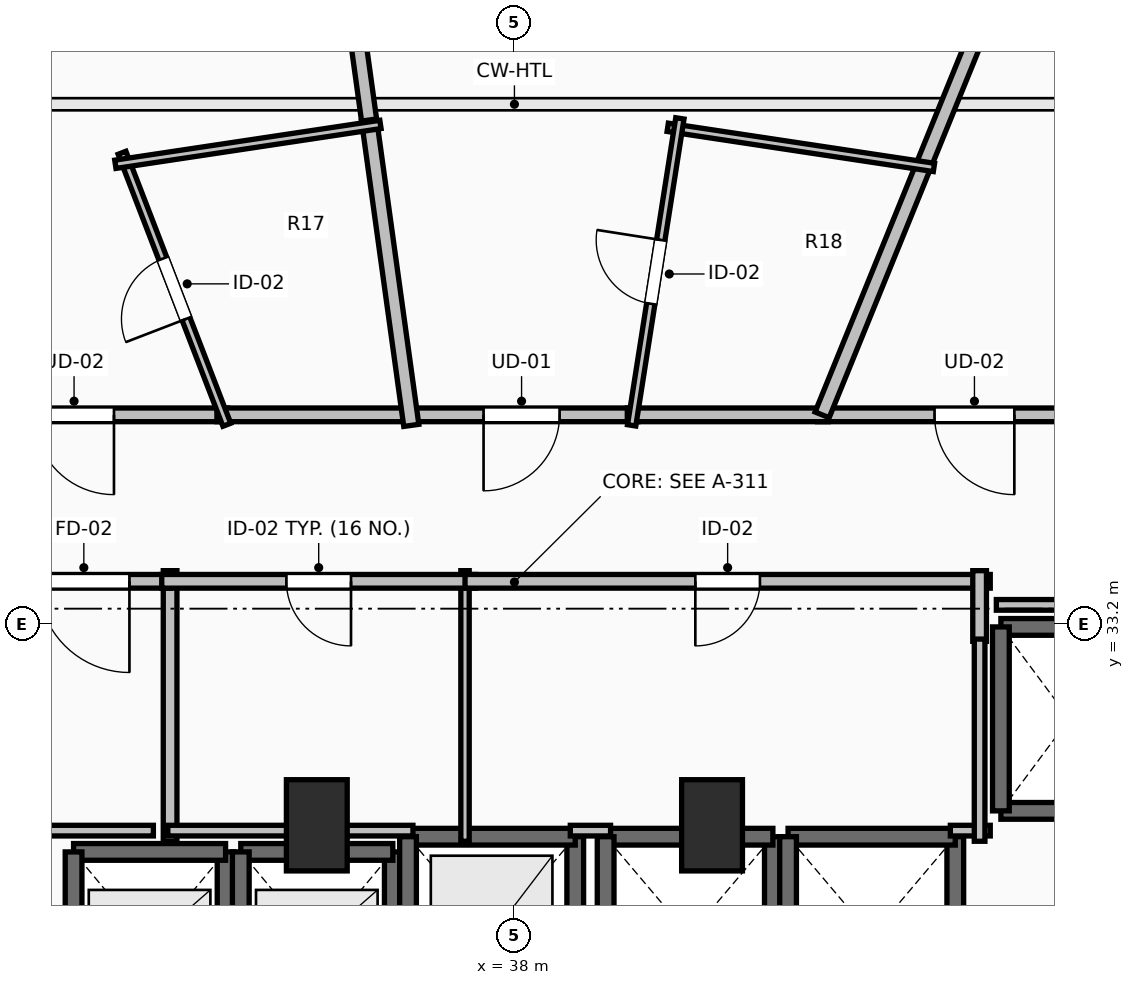
"""IFC4 building model, lengths in metres.
Left out: names, types, materials, properties, quantities, classifications, styles, units other than length and angle.
Written with IfcOpenShell. Run it as: python <this file> out.ifc"""

import sys

from ifc_helpers import new_model, si_unit, direction, frame, frame_2d, origin, origin_2d, place, context, subcontext, project, spatial, rectangle, extrude, element, fill, save


model = new_model("IFC4")
c1 = context("Model", 3, precision=1e-05, world=origin(), true_north=direction((0.0, 1.0)))
c2 = subcontext(c1, "Body", "Model", "MODEL_VIEW")
j1 = project(units=[si_unit("LENGTHUNIT", "METRE"), si_unit("PLANEANGLEUNIT", "RADIAN")], contexts=[c1])
p1 = place(None, origin())
s1 = spatial("IfcSite", under=j1, at=p1, CompositionType="ELEMENT")
p2 = place(p1, origin())
s2 = spatial("IfcBuilding", under=s1, at=p2, CompositionType="ELEMENT")
p3 = place(p2, frame((0.0, 0.0, 92.8)))
s3 = spatial("IfcBuildingStorey", under=s2, at=p3, CompositionType="ELEMENT", Elevation=92.8)
for number, where, z_axis, x_axis in (
    (1, (35.4, 30.55, 0.0), (0.0, 0.0, 1.0), (1.0, 0.0, 0.0)),
    (2, (40.6, 30.55, 0.0), (0.0, 0.0, 1.0), (1.0, 0.0, 0.0)),
):
    element("IfcColumn", number, at=place(p3, frame(where, z_axis=z_axis, x_axis=x_axis)), inside=s3, PredefinedType="PILASTER", context=c2, shape_type="SweptSolid", body=[
        extrude(rectangle(XDim=0.8, YDim=1.2, at=origin_2d()), origin(), (0.0, 0.0, 1.0), 3.5),
    ])
p4 = place(p3, frame((34.2, 27.8, 0.0), z_axis=(0.0, 0.0, 1.0), x_axis=(0.0, 1.0, 0.0)))
e3 = element("IfcWall", 3, at=p4, inside=s3, PredefinedType="SOLIDWALL", context=c2, shape_type="SweptSolid", body=[
    extrude(rectangle(XDim=2.4, YDim=0.22, at=frame_2d((1.2, 0.0))), origin(), (0.0, 0.0, 1.0), 3.24),
])
p5 = place(p3, frame((34.2, 30.2, 0.0), z_axis=(0.0, 0.0, 1.0), x_axis=(-1.0, 0.0, 0.0)))
e4 = element("IfcWall", 4, at=p5, inside=s3, PredefinedType="SOLIDWALL", context=c2, shape_type="SweptSolid", body=[
    extrude(rectangle(XDim=2.0, YDim=0.22, at=frame_2d((1.0, 0.0))), origin(), (0.0, 0.0, 1.0), 3.24),
])
for number, where, z_axis, x_axis in (
    (5, (32.2, 30.2, 0.0), (0.0, 0.0, 1.0), (0.0, -1.0, 0.0)),
    (6, (36.4, 27.8, 0.0), (0.0, 0.0, 1.0), (0.0, 1.0, 0.0)),
):
    element("IfcWall", number, at=place(p3, frame(where, z_axis=z_axis, x_axis=x_axis)), inside=s3, PredefinedType="SOLIDWALL", context=c2, shape_type="SweptSolid", body=[
        extrude(rectangle(XDim=2.4, YDim=0.22, at=frame_2d((1.2, 0.0))), origin(), (0.0, 0.0, 1.0), 3.24),
    ])
p6 = place(p3, frame((36.4, 30.2, 0.0), z_axis=(0.0, 0.0, 1.0), x_axis=(-1.0, 0.0, 0.0)))
e7 = element("IfcWall", 7, at=p6, inside=s3, PredefinedType="SOLIDWALL", context=c2, shape_type="SweptSolid", body=[
    extrude(rectangle(XDim=2.0, YDim=0.22, at=frame_2d((1.0, 0.0))), origin(), (0.0, 0.0, 1.0), 3.24),
])
p7 = place(p3, frame((34.4, 30.2, 0.0), z_axis=(0.0, 0.0, 1.0), x_axis=(0.0, -1.0, 0.0)))
e8 = element("IfcWall", 8, at=p7, inside=s3, PredefinedType="SOLIDWALL", context=c2, shape_type="SweptSolid", body=[
    extrude(rectangle(XDim=2.4, YDim=0.22, at=frame_2d((1.2, 0.0))), origin(), (0.0, 0.0, 1.0), 3.24),
])
p8 = place(p3, frame((38.8, 27.8, 0.0), z_axis=(0.0, 0.0, 1.0), x_axis=(0.0, 1.0, 0.0)))
e9 = element("IfcWall", 9, at=p8, inside=s3, PredefinedType="SOLIDWALL", context=c2, shape_type="SweptSolid", body=[
    extrude(rectangle(XDim=2.6, YDim=0.22, at=frame_2d((1.3, 0.0))), origin(), (0.0, 0.0, 1.0), 3.24),
])
p9 = place(p3, frame((38.8, 30.4, 0.0), z_axis=(0.0, 0.0, 1.0), x_axis=(-1.0, 0.0, 0.0)))
e10 = element("IfcWall", 10, at=p9, inside=s3, PredefinedType="SOLIDWALL", context=c2, shape_type="SweptSolid", body=[
    extrude(rectangle(XDim=2.2, YDim=0.22, at=frame_2d((1.1, 0.0))), origin(), (0.0, 0.0, 1.0), 3.24),
])
for number, where, z_axis, x_axis in (
    (11, (36.6, 30.4, 0.0), (0.0, 0.0, 1.0), (0.0, -1.0, 0.0)),
    (12, (41.4, 27.8, 0.0), (0.0, 0.0, 1.0), (0.0, 1.0, 0.0)),
):
    element("IfcWall", number, at=place(p3, frame(where, z_axis=z_axis, x_axis=x_axis)), inside=s3, PredefinedType="SOLIDWALL", context=c2, shape_type="SweptSolid", body=[
        extrude(rectangle(XDim=2.6, YDim=0.22, at=frame_2d((1.3, 0.0))), origin(), (0.0, 0.0, 1.0), 3.24),
    ])
p10 = place(p3, frame((41.4, 30.4, 0.0), z_axis=(0.0, 0.0, 1.0), x_axis=(-1.0, 0.0, 0.0)))
e13 = element("IfcWall", 13, at=p10, inside=s3, PredefinedType="SOLIDWALL", context=c2, shape_type="SweptSolid", body=[
    extrude(rectangle(XDim=2.2, YDim=0.22, at=frame_2d((1.1, 0.0))), origin(), (0.0, 0.0, 1.0), 3.24),
])
for number, where, z_axis, x_axis in (
    (14, (39.2, 30.4, 0.0), (0.0, 0.0, 1.0), (0.0, -1.0, 0.0)),
    (15, (43.8, 27.8, 0.0), (0.0, 0.0, 1.0), (0.0, 1.0, 0.0)),
):
    element("IfcWall", number, at=place(p3, frame(where, z_axis=z_axis, x_axis=x_axis)), inside=s3, PredefinedType="SOLIDWALL", context=c2, shape_type="SweptSolid", body=[
        extrude(rectangle(XDim=2.6, YDim=0.22, at=frame_2d((1.3, 0.0))), origin(), (0.0, 0.0, 1.0), 3.24),
    ])
p11 = place(p3, frame((43.8, 30.4, 0.0), z_axis=(0.0, 0.0, 1.0), x_axis=(-1.0, 0.0, 0.0)))
e16 = element("IfcWall", 16, at=p11, inside=s3, PredefinedType="SOLIDWALL", context=c2, shape_type="SweptSolid", body=[
    extrude(rectangle(XDim=2.2, YDim=0.22, at=frame_2d((1.1, 0.0))), origin(), (0.0, 0.0, 1.0), 3.24),
])
p12 = place(p3, frame((41.6, 30.4, 0.0), z_axis=(0.0, 0.0, 1.0), x_axis=(0.0, -1.0, 0.0)))
e17 = element("IfcWall", 17, at=p12, inside=s3, PredefinedType="SOLIDWALL", context=c2, shape_type="SweptSolid", body=[
    extrude(rectangle(XDim=2.6, YDim=0.22, at=frame_2d((1.3, 0.0))), origin(), (0.0, 0.0, 1.0), 3.24),
])
for number, where, z_axis, x_axis in (
    (18, (44.4, 30.74, 0.0), (0.0, 0.0, 1.0), (1.0, 0.0, 0.0)),
    (19, (46.2, 33.16, 0.0), (0.0, 0.0, 1.0), (-1.0, 0.0, 0.0)),
):
    element("IfcWall", number, at=place(p3, frame(where, z_axis=z_axis, x_axis=x_axis)), inside=s3, PredefinedType="SOLIDWALL", context=c2, shape_type="SweptSolid", body=[
        extrude(rectangle(XDim=1.8, YDim=0.22, at=frame_2d((0.9, 0.0))), origin(), (0.0, 0.0, 1.0), 3.24),
    ])
p13 = place(p3, frame((44.4, 33.16, 0.0), z_axis=(0.0, 0.0, 1.0), x_axis=(0.0, -1.0, 0.0)))
e20 = element("IfcWall", 20, at=p13, inside=s3, PredefinedType="SOLIDWALL", context=c2, shape_type="SweptSolid", body=[
    extrude(rectangle(XDim=2.42, YDim=0.22, at=frame_2d((1.21, 0.0))), origin(), (0.0, 0.0, 1.0), 3.24),
])
p14 = place(p3, frame((33.47, 30.34, 0.0), z_axis=(0.0, 0.0, 1.0), x_axis=(0.0, 1.0, 0.0)))
e21 = element("IfcWall", 21, at=p14, inside=s3, PredefinedType="PARTITIONING", context=c2, shape_type="SweptSolid", body=[
    extrude(rectangle(XDim=3.56, YDim=0.18, at=frame_2d((1.78, 0.0))), origin(), (0.0, 0.0, 1.0), 3.24),
])
p15 = place(p3, frame((33.47, 33.76, 0.0), z_axis=(0.0, 0.0, 1.0), x_axis=(-1.0, 0.0, 0.0)))
e22 = element("IfcWall", 22, at=p15, inside=s3, PredefinedType="PARTITIONING", context=c2, shape_type="SweptSolid", body=[
    extrude(rectangle(XDim=2.27, YDim=0.18, at=frame_2d((1.135, 0.0))), origin(), (0.0, 0.0, 1.0), 3.24),
])
p16 = place(p15, frame((0.535, 0.0, 0.0)))
e23 = element("IfcOpeningElement", 23, at=p16, cuts=e22, PredefinedType="OPENING", context=c2, shape_type="SweptSolid", body=[
    extrude(rectangle(XDim=1.2, YDim=2.15, at=frame_2d((0.6, 1.075))), frame((0.0, 0.105, 0.0), z_axis=(0.0, -1.0, 0.0), x_axis=(1.0, 0.0, 0.0)), (0.0, 0.0, 1.0), 0.21),
])
p17 = place(p3, frame((37.35, 30.34, 0.0), z_axis=(0.0, 0.0, 1.0), x_axis=(0.0, 1.0, 0.0)))
e24 = element("IfcWall", 24, at=p17, inside=s3, PredefinedType="PARTITIONING", context=c2, shape_type="SweptSolid", body=[
    extrude(rectangle(XDim=3.56, YDim=0.11, at=frame_2d((1.78, 0.0))), origin(), (0.0, 0.0, 1.0), 2.432),
])
p18 = place(p3, frame((37.49, 33.76, 0.0), z_axis=(0.0, 0.0, 1.0), x_axis=(-1.0, 0.0, 0.0)))
e25 = element("IfcWall", 25, at=p18, inside=s3, PredefinedType="PARTITIONING", context=c2, shape_type="SweptSolid", body=[
    extrude(rectangle(XDim=4.13, YDim=0.18, at=frame_2d((2.065, 0.0))), origin(), (0.0, 0.0, 1.0), 3.24),
])
p19 = place(p18, frame((1.64, 0.0, 0.0)))
e26 = element("IfcOpeningElement", 26, at=p19, cuts=e25, PredefinedType="OPENING", context=c2, shape_type="SweptSolid", body=[
    extrude(rectangle(XDim=0.85, YDim=2.1, at=frame_2d((0.425, 1.05))), frame((0.0, 0.105, 0.0), z_axis=(0.0, -1.0, 0.0), x_axis=(1.0, 0.0, 0.0)), (0.0, 0.0, 1.0), 0.21),
])
p20 = place(p3, frame((44.26, 33.76, 0.0), z_axis=(0.0, 0.0, 1.0), x_axis=(-1.0, 0.0, 0.0)))
e27 = element("IfcWall", 27, at=p20, inside=s3, PredefinedType="PARTITIONING", context=c2, shape_type="SweptSolid", body=[
    extrude(rectangle(XDim=6.91, YDim=0.18, at=frame_2d((3.455, 0.0))), origin(), (0.0, 0.0, 1.0), 3.24),
])
p21 = place(p20, frame((3.03, 0.0, 0.0)))
e28 = element("IfcOpeningElement", 28, at=p21, cuts=e27, PredefinedType="OPENING", context=c2, shape_type="SweptSolid", body=[
    extrude(rectangle(XDim=0.85, YDim=2.1, at=frame_2d((0.425, 1.05))), frame((0.0, 0.105, 0.0), z_axis=(0.0, -1.0, 0.0), x_axis=(1.0, 0.0, 0.0)), (0.0, 0.0, 1.0), 0.21),
])
p22 = place(p3, frame((44.12, 32.97, 0.0), z_axis=(0.0, 0.0, 1.0), x_axis=(0.0, 1.0, 0.0)))
e29 = element("IfcWall", 29, at=p22, inside=s3, PredefinedType="PARTITIONING", context=c2, shape_type="SweptSolid", body=[
    extrude(rectangle(XDim=0.93, YDim=0.18, at=frame_2d((0.465, 0.0))), origin(), (0.0, 0.0, 1.0), 3.24),
])
p23 = place(p3, frame((46.116, 35.95, 0.0), z_axis=(0.0, 0.0, 1.0), x_axis=(-1.0, 0.0, 0.0)))
e30 = element("IfcWall", 30, at=p23, inside=s3, PredefinedType="PARTITIONING", context=c2, shape_type="SweptSolid", body=[
    extrude(rectangle(XDim=4.128, YDim=0.18, at=frame_2d((2.064, 0.0))), origin(), (0.0, 0.0, 1.0), 2.972),
])
p24 = place(p23, frame((1.539, 0.0, 0.0)))
e31 = element("IfcOpeningElement", 31, at=p24, cuts=e30, PredefinedType="OPENING", context=c2, shape_type="SweptSolid", body=[
    extrude(rectangle(XDim=1.05, YDim=2.2, at=frame_2d((0.525, 1.1))), frame((0.0, 0.105, 0.0), z_axis=(0.0, -1.0, 0.0), x_axis=(1.0, 0.0, 0.0)), (0.0, 0.0, 1.0), 0.21),
])
p25 = place(p3, frame((39.625, 35.95, 0.0), z_axis=(0.0, 0.0, 1.0), x_axis=(-1.0, 0.0, 0.0)))
e32 = element("IfcWall", 32, at=p25, inside=s3, PredefinedType="PARTITIONING", context=c2, shape_type="SweptSolid", body=[
    extrude(rectangle(XDim=3.062, YDim=0.18, at=frame_2d((1.531, 0.0))), origin(), (0.0, 0.0, 1.0), 2.972),
])
p26 = place(p25, frame((1.031, 0.0, 0.0)))
e33 = element("IfcOpeningElement", 33, at=p26, cuts=e32, PredefinedType="OPENING", context=c2, shape_type="SweptSolid", body=[
    extrude(rectangle(XDim=1.0, YDim=2.15, at=frame_2d((0.5, 1.075))), frame((0.0, 0.105, 0.0), z_axis=(0.0, -1.0, 0.0), x_axis=(1.0, 0.0, 0.0)), (0.0, 0.0, 1.0), 0.21),
])
p27 = place(p3, frame((42.128, 35.95, 0.0), z_axis=(0.0, 0.0, 1.0), x_axis=(-1.0, 0.0, 0.0)))
e34 = element("IfcWall", 34, at=p27, inside=s3, PredefinedType="PARTITIONING", context=c2, shape_type="SweptSolid", body=[
    extrude(rectangle(XDim=2.643, YDim=0.18, at=frame_2d((1.321, 0.0))), origin(), (0.0, 0.0, 1.0), 2.972),
])
p28 = place(p3, frame((34.226, 35.95, 0.0), z_axis=(0.0, 0.0, 1.0), x_axis=(-1.0, 0.0, 0.0)))
e35 = element("IfcWall", 35, at=p28, inside=s3, PredefinedType="PARTITIONING", context=c2, shape_type="SweptSolid", body=[
    extrude(rectangle(XDim=4.039, YDim=0.18, at=frame_2d((2.02, 0.0))), origin(), (0.0, 0.0, 1.0), 2.432),
])
p29 = place(p28, frame((1.494, 0.0, 0.0)))
e36 = element("IfcOpeningElement", 36, at=p29, cuts=e35, PredefinedType="OPENING", context=c2, shape_type="SweptSolid", body=[
    extrude(rectangle(XDim=1.05, YDim=2.2, at=frame_2d((0.525, 1.1))), frame((0.0, 0.105, 0.0), z_axis=(0.0, -1.0, 0.0), x_axis=(1.0, 0.0, 0.0)), (0.0, 0.0, 1.0), 0.21),
])
p30 = place(p3, frame((36.703, 35.95, 0.0), z_axis=(0.0, 0.0, 1.0), x_axis=(-1.0, 0.0, 0.0)))
e37 = element("IfcWall", 37, at=p30, inside=s3, PredefinedType="PARTITIONING", context=c2, shape_type="SweptSolid", body=[
    extrude(rectangle(XDim=2.617, YDim=0.18, at=frame_2d((1.309, 0.0))), origin(), (0.0, 0.0, 1.0), 2.972),
])
p31 = place(p3, frame((45.682, 44.88, 0.0), z_axis=(0.0, 0.0, 1.0), x_axis=(-0.376911553655, -0.9262492541, 0.0)))
e38 = element("IfcWall", 38, at=p31, inside=s3, PredefinedType="PARTITIONING", context=c2, shape_type="SweptSolid", body=[
    extrude(rectangle(XDim=9.641, YDim=0.2, at=frame_2d((4.82, 0.0))), origin(), (0.0, 0.0, 1.0), 2.677),
])
p32 = place(p3, frame((40.017, 39.733, 0.0), z_axis=(0.0, 0.0, 1.0), x_axis=(0.988835521732, -0.149011110196, 0.0)))
e39 = element("IfcWall", 39, at=p32, inside=s3, PredefinedType="PARTITIONING", context=c2, shape_type="SweptSolid", body=[
    extrude(rectangle(XDim=3.542, YDim=0.11, at=frame_2d((1.771, 0.0))), origin(), (0.0, 0.0, 1.0), 3.24),
])
p33 = place(p3, frame((39.542, 35.812, 0.0), z_axis=(0.0, 0.0, 1.0), x_axis=(0.155211191462, 0.98788131172, 0.0)))
e40 = element("IfcWall", 40, at=p33, inside=s3, PredefinedType="PARTITIONING", context=c2, shape_type="SweptSolid", body=[
    extrude(rectangle(XDim=4.088, YDim=0.11, at=frame_2d((2.044, 0.0))), origin(), (0.0, 0.0, 1.0), 2.922),
])
p34 = place(p33, frame((1.619, 0.0, 0.0)))
e41 = element("IfcOpeningElement", 41, at=p34, cuts=e40, PredefinedType="OPENING", context=c2, shape_type="SweptSolid", body=[
    extrude(rectangle(XDim=0.85, YDim=2.1, at=frame_2d((0.425, 1.05))), frame((0.0, 0.07, 0.0), z_axis=(0.0, -1.0, 0.0), x_axis=(1.0, 0.0, 0.0)), (0.0, 0.0, 1.0), 0.14),
])
p35 = place(p3, frame((35.283, 45.647, 0.0), z_axis=(0.0, 0.0, 1.0), x_axis=(0.137015172239, -0.990568948926, 0.0)))
e42 = element("IfcWall", 42, at=p35, inside=s3, PredefinedType="PARTITIONING", context=c2, shape_type="SweptSolid", body=[
    extrude(rectangle(XDim=6.014, YDim=0.2, at=frame_2d((3.007, 0.0))), origin(), (0.0, 0.0, 1.0), 2.432),
])
p36 = place(p3, frame((36.087, 39.829, 0.0), z_axis=(0.0, 0.0, 1.0), x_axis=(0.137071274589, -0.990561187248, 0.0)))
e43 = element("IfcWall", 43, at=p36, inside=s3, PredefinedType="PARTITIONING", context=c2, shape_type="SweptSolid", body=[
    extrude(rectangle(XDim=4.056, YDim=0.2, at=frame_2d((2.028, 0.0))), origin(), (0.0, 0.0, 1.0), 2.922),
])
p37 = place(p3, frame((34.216, 35.819, 0.0), z_axis=(0.0, 0.0, 1.0), x_axis=(-0.359516562862, 0.933138704067, 0.0)))
e44 = element("IfcWall", 44, at=p37, inside=s3, PredefinedType="PARTITIONING", context=c2, shape_type="SweptSolid", body=[
    extrude(rectangle(XDim=3.835, YDim=0.11, at=frame_2d((1.917, 0.0))), origin(), (0.0, 0.0, 1.0), 2.432),
])
p38 = place(p37, frame((1.492, 0.0, 0.0)))
e45 = element("IfcOpeningElement", 45, at=p38, cuts=e44, PredefinedType="OPENING", context=c2, shape_type="SweptSolid", body=[
    extrude(rectangle(XDim=0.85, YDim=2.1, at=frame_2d((0.425, 1.05))), frame((0.0, 0.07, 0.0), z_axis=(0.0, -1.0, 0.0), x_axis=(1.0, 0.0, 0.0)), (0.0, 0.0, 1.0), 0.14),
])
p39 = place(p3, frame((32.75, 39.246, 0.0), z_axis=(0.0, 0.0, 1.0), x_axis=(0.988874324222, 0.148753389525, 0.0)))
e46 = element("IfcWall", 46, at=p39, inside=s3, PredefinedType="PARTITIONING", context=c2, shape_type="SweptSolid", body=[
    extrude(rectangle(XDim=3.527, YDim=0.11, at=frame_2d((1.764, 0.0))), origin(), (0.0, 0.0, 1.0), 2.432),
])
p40 = place(p3, frame((31.2, 30.48, 0.0), z_axis=(0.0, 0.0, 1.0), x_axis=(1.0, 0.0, 0.0)))
e47 = element("IfcWall", 47, at=p40, inside=s3, PredefinedType="PARTITIONING", context=c2, shape_type="SweptSolid", body=[
    extrude(rectangle(XDim=2.05, YDim=0.14, at=frame_2d((1.025, 0.0))), origin(), (0.0, 0.0, 1.0), 3.24),
])
p41 = place(p3, frame((33.44, 30.48, 0.0), z_axis=(0.0, 0.0, 1.0), x_axis=(1.0, 0.0, 0.0)))
e48 = element("IfcWall", 48, at=p41, inside=s3, PredefinedType="PARTITIONING", context=c2, shape_type="SweptSolid", body=[
    extrude(rectangle(XDim=3.225, YDim=0.14, at=frame_2d((1.613, 0.0))), origin(), (0.0, 0.0, 1.0), 2.432),
])
p42 = place(p3, frame((38.735, 30.48, 0.0), z_axis=(0.0, 0.0, 1.0), x_axis=(1.0, 0.0, 0.0)))
e49 = element("IfcWall", 49, at=p42, inside=s3, PredefinedType="PARTITIONING", context=c2, shape_type="SweptSolid", body=[
    extrude(rectangle(XDim=0.53, YDim=0.14, at=frame_2d((0.265, 0.0))), origin(), (0.0, 0.0, 1.0), 2.432),
])
p43 = place(p3, frame((43.735, 30.48, 0.0), z_axis=(0.0, 0.0, 1.0), x_axis=(1.0, 0.0, 0.0)))
e50 = element("IfcWall", 50, at=p43, inside=s3, PredefinedType="PARTITIONING", context=c2, shape_type="SweptSolid", body=[
    extrude(rectangle(XDim=0.525, YDim=0.14, at=frame_2d((0.262, 0.0))), origin(), (0.0, 0.0, 1.0), 3.24),
])
p44 = place(p3, frame((44.12, 30.34, 0.0), z_axis=(0.0, 0.0, 1.0), x_axis=(0.0, 1.0, 0.0)))
e51 = element("IfcWall", 51, at=p44, inside=s3, PredefinedType="PARTITIONING", context=c2, shape_type="SweptSolid", body=[
    extrude(rectangle(XDim=2.66, YDim=0.14, at=frame_2d((1.33, 0.0))), origin(), (0.0, 0.0, 1.0), 3.24),
])
p45 = place(p3, frame((44.34, 33.45, 0.0), z_axis=(0.0, 0.0, 1.0), x_axis=(1.0, 0.0, 0.0)))
e52 = element("IfcWall", 52, at=p45, inside=s3, PredefinedType="PARTITIONING", context=c2, shape_type="SweptSolid", body=[
    extrude(rectangle(XDim=4.21, YDim=0.14, at=frame_2d((2.105, 0.0))), origin(), (0.0, 0.0, 1.0), 2.432),
])
p46 = place(p16, origin())
e53 = element("IfcDoor", 53, at=p46, inside=s3, OperationType="SINGLE_SWING_LEFT", PredefinedType="DOOR", context=c2, shape_type="SweptSolid", body=[
    extrude(rectangle(XDim=1.2, YDim=2.15, at=frame_2d((0.6, 1.075))), frame((0.0, 0.025, 0.0), z_axis=(0.0, -1.0, 0.0), x_axis=(1.0, 0.0, 0.0)), (0.0, 0.0, 1.0), 0.05),
])
fill(e23, e53)
p47 = place(p19, origin())
e54 = element("IfcDoor", 54, at=p47, inside=s3, OperationType="SINGLE_SWING_LEFT", PredefinedType="DOOR", context=c2, shape_type="SweptSolid", body=[
    extrude(rectangle(XDim=0.85, YDim=2.1, at=frame_2d((0.425, 1.05))), frame((0.0, 0.025, 0.0), z_axis=(0.0, -1.0, 0.0), x_axis=(1.0, 0.0, 0.0)), (0.0, 0.0, 1.0), 0.05),
])
fill(e26, e54)
p48 = place(p21, origin())
e55 = element("IfcDoor", 55, at=p48, inside=s3, OperationType="SINGLE_SWING_RIGHT", PredefinedType="DOOR", context=c2, shape_type="SweptSolid", body=[
    extrude(rectangle(XDim=0.85, YDim=2.1, at=frame_2d((0.425, 1.05))), frame((0.0, 0.025, 0.0), z_axis=(0.0, -1.0, 0.0), x_axis=(1.0, 0.0, 0.0)), (0.0, 0.0, 1.0), 0.05),
])
fill(e28, e55)
p49 = place(p24, origin())
e56 = element("IfcDoor", 56, at=p49, inside=s3, OperationType="SINGLE_SWING_LEFT", PredefinedType="DOOR", context=c2, shape_type="SweptSolid", body=[
    extrude(rectangle(XDim=1.05, YDim=2.2, at=frame_2d((0.525, 1.1))), frame((0.0, 0.025, 0.0), z_axis=(0.0, -1.0, 0.0), x_axis=(1.0, 0.0, 0.0)), (0.0, 0.0, 1.0), 0.05),
])
fill(e31, e56)
p50 = place(p26, origin())
e57 = element("IfcDoor", 57, at=p50, inside=s3, OperationType="SINGLE_SWING_RIGHT", PredefinedType="DOOR", context=c2, shape_type="SweptSolid", body=[
    extrude(rectangle(XDim=1.0, YDim=2.15, at=frame_2d((0.5, 1.075))), frame((0.0, 0.025, 0.0), z_axis=(0.0, -1.0, 0.0), x_axis=(1.0, 0.0, 0.0)), (0.0, 0.0, 1.0), 0.05),
])
fill(e33, e57)
p51 = place(p29, origin())
e58 = element("IfcDoor", 58, at=p51, inside=s3, OperationType="SINGLE_SWING_LEFT", PredefinedType="DOOR", context=c2, shape_type="SweptSolid", body=[
    extrude(rectangle(XDim=1.05, YDim=2.2, at=frame_2d((0.525, 1.1))), frame((0.0, 0.025, 0.0), z_axis=(0.0, -1.0, 0.0), x_axis=(1.0, 0.0, 0.0)), (0.0, 0.0, 1.0), 0.05),
])
fill(e36, e58)
p52 = place(p34, origin())
e59 = element("IfcDoor", 59, at=p52, inside=s3, OperationType="SINGLE_SWING_RIGHT", PredefinedType="DOOR", context=c2, shape_type="SweptSolid", body=[
    extrude(rectangle(XDim=0.85, YDim=2.1, at=frame_2d((0.425, 1.05))), frame((0.0, 0.025, 0.0), z_axis=(0.0, -1.0, 0.0), x_axis=(1.0, 0.0, 0.0)), (0.0, 0.0, 1.0), 0.05),
])
fill(e41, e59)
p53 = place(p38, origin())
e60 = element("IfcDoor", 60, at=p53, inside=s3, OperationType="SINGLE_SWING_LEFT", PredefinedType="DOOR", context=c2, shape_type="SweptSolid", body=[
    extrude(rectangle(XDim=0.85, YDim=2.1, at=frame_2d((0.425, 1.05))), frame((0.0, 0.025, 0.0), z_axis=(0.0, -1.0, 0.0), x_axis=(1.0, 0.0, 0.0)), (0.0, 0.0, 1.0), 0.05),
])
fill(e45, e60)
save(model, sys.argv[1])
